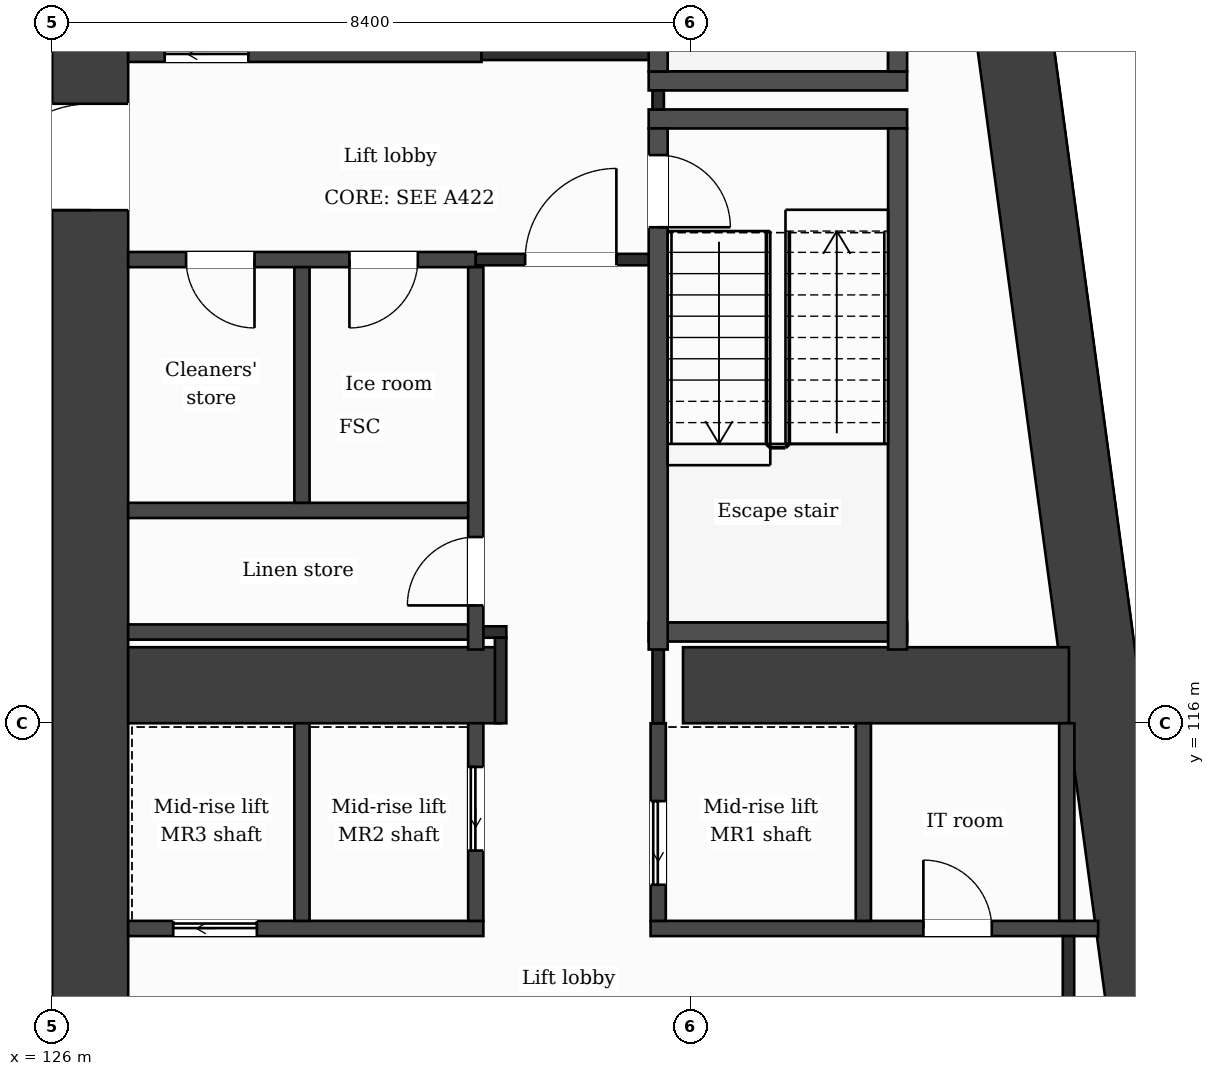
"""IFC4 building model, lengths in metres.
Left out: names, types, materials, properties, quantities, classifications, styles, units other than length and angle.
Written with IfcOpenShell. Run it as: python <this file> out.ifc"""

import sys

from ifc_helpers import new_model, si_unit, direction, frame, frame_2d, origin, place, context, subcontext, project, spatial, rectangle, extrude, element, fill, save


model = new_model("IFC4")
c1 = context("Model", 3, precision=1e-05, world=origin(), true_north=direction((0.0, 1.0)))
c2 = subcontext(c1, "Body", "Model", "MODEL_VIEW")
j1 = project(units=[si_unit("LENGTHUNIT", "METRE"), si_unit("PLANEANGLEUNIT", "RADIAN")], contexts=[c1])
p1 = place(None, origin())
s1 = spatial("IfcSite", under=j1, at=p1, CompositionType="ELEMENT")
p2 = place(p1, origin())
s2 = spatial("IfcBuilding", under=s1, at=p2, CompositionType="ELEMENT")
p3 = place(p2, frame((0.0, 0.0, 94.7)))
s3 = spatial("IfcBuildingStorey", under=s2, at=p3, CompositionType="ELEMENT", Elevation=94.7)
p4 = place(p3, frame((137.732, 131.9, 0.0), z_axis=(0.0, 0.0, 1.0), x_axis=(0.133411141623, -0.991060778808, 0.0)))
e1 = element("IfcWall", 1, at=p4, inside=s3, PredefinedType="SHEAR", context=c2, shape_type="SweptSolid", body=[
    extrude(rectangle(XDim=21.189, YDim=1.0, at=frame_2d((10.595, 0.0))), origin(), (0.0, 0.0, 1.0), 3.7),
])
p5 = place(p3, frame((126.5, 110.9, 0.0), z_axis=(0.0, 0.0, 1.0), x_axis=(0.0, 1.0, 0.0)))
e2 = element("IfcWall", 2, at=p5, inside=s3, PredefinedType="SHEAR", context=c2, shape_type="SweptSolid", body=[
    extrude(rectangle(XDim=21.0, YDim=1.0, at=frame_2d((10.5, 0.0))), origin(), (0.0, 0.0, 1.0), 3.7),
])
p6 = place(p5, frame((11.85, 0.0, 0.0)))
e3 = element("IfcOpeningElement", 3, at=p6, cuts=e2, PredefinedType="OPENING", context=c2, shape_type="SweptSolid", body=[
    extrude(rectangle(XDim=1.4, YDim=2.1, at=frame_2d((0.7, 1.05))), frame((0.0, 0.51, 0.0), z_axis=(0.0, -1.0, 0.0), x_axis=(1.0, 0.0, 0.0)), (0.0, 0.0, 1.0), 1.02),
])
p7 = place(p3, frame((127.0, 116.5, 0.0), z_axis=(0.0, 0.0, 1.0), x_axis=(1.0, 0.0, 0.0)))
e4 = element("IfcWall", 4, at=p7, inside=s3, PredefinedType="SHEAR", context=c2, shape_type="SweptSolid", body=[
    extrude(rectangle(XDim=4.9, YDim=1.0, at=frame_2d((2.45, 0.0))), origin(), (0.0, 0.0, 1.0), 3.7),
])
p8 = place(p3, frame((134.3, 116.5, 0.0), z_axis=(0.0, 0.0, 1.0), x_axis=(1.0, 0.0, 0.0)))
e5 = element("IfcWall", 5, at=p8, inside=s3, PredefinedType="SHEAR", context=c2, shape_type="SweptSolid", body=[
    extrude(rectangle(XDim=5.077, YDim=1.0, at=frame_2d((2.539, 0.0))), origin(), (0.0, 0.0, 1.0), 3.7),
])
p9 = place(p3, frame((127.0, 113.3, 0.0), z_axis=(0.0, 0.0, 1.0), x_axis=(1.0, 0.0, 0.0)))
e6 = element("IfcWall", 6, at=p9, inside=s3, PredefinedType="PARTITIONING", context=c2, shape_type="SweptSolid", body=[
    extrude(rectangle(XDim=4.673, YDim=0.2, at=frame_2d((2.336, 0.0))), origin(), (0.0, 0.0, 1.0), 3.38),
])
p10 = place(p9, frame((0.593, 0.0, 0.0)))
e7 = element("IfcOpeningElement", 7, at=p10, cuts=e6, PredefinedType="OPENING", context=c2, shape_type="SweptSolid", body=[
    extrude(rectangle(XDim=1.1, YDim=2.1, at=frame_2d((0.55, 1.05))), frame((0.0, 0.11, 0.0), z_axis=(0.0, -1.0, 0.0), x_axis=(1.0, 0.0, 0.0)), (0.0, 0.0, 1.0), 0.22),
])
p11 = place(p3, frame((133.873, 113.3, 0.0), z_axis=(0.0, 0.0, 1.0), x_axis=(1.0, 0.0, 0.0)))
e8 = element("IfcWall", 8, at=p11, inside=s3, PredefinedType="PARTITIONING", context=c2, shape_type="SweptSolid", body=[
    extrude(rectangle(XDim=5.888, YDim=0.2, at=frame_2d((2.944, 0.0))), origin(), (0.0, 0.0, 1.0), 3.38),
])
p12 = place(p11, frame((3.589, 0.0, 0.0)))
e9 = element("IfcOpeningElement", 9, at=p12, cuts=e8, PredefinedType="OPENING", context=c2, shape_type="SweptSolid", body=[
    extrude(rectangle(XDim=0.9, YDim=2.1, at=frame_2d((0.45, 1.05))), frame((0.0, 0.11, 0.0), z_axis=(0.0, -1.0, 0.0), x_axis=(1.0, 0.0, 0.0)), (0.0, 0.0, 1.0), 0.22),
])
p13 = place(p3, frame((127.0, 117.2, 0.0), z_axis=(0.0, 0.0, 1.0), x_axis=(1.0, 0.0, 0.0)))
e10 = element("IfcWall", 10, at=p13, inside=s3, PredefinedType="PARTITIONING", context=c2, shape_type="SweptSolid", body=[
    extrude(rectangle(XDim=4.573, YDim=0.2, at=frame_2d((2.287, 0.0))), origin(), (0.0, 0.0, 1.0), 3.38),
])
p14 = place(p3, frame((131.573, 117.2, 0.0), z_axis=(0.0, 0.0, 1.0), x_axis=(1.0, 0.0, 0.0)))
e11 = element("IfcWall", 11, at=p14, inside=s3, PredefinedType="PARTITIONING", context=c2, shape_type="SweptSolid", body=[
    extrude(rectangle(XDim=0.402, YDim=0.15, at=frame_2d((0.201, 0.0))), origin(), (0.0, 0.0, 1.0), 3.38),
])
p15 = place(p3, frame((133.848, 117.2, 0.0), z_axis=(0.0, 0.0, 1.0), x_axis=(1.0, 0.0, 0.0)))
e12 = element("IfcWall", 12, at=p15, inside=s3, PredefinedType="PARTITIONING", context=c2, shape_type="SweptSolid", body=[
    extrude(rectangle(XDim=3.4, YDim=0.25, at=frame_2d((1.7, 0.0))), origin(), (0.0, 0.0, 1.0), 3.38),
])
p16 = place(p3, frame((127.0, 118.8, 0.0), z_axis=(0.0, 0.0, 1.0), x_axis=(1.0, 0.0, 0.0)))
e13 = element("IfcWall", 13, at=p16, inside=s3, PredefinedType="PARTITIONING", context=c2, shape_type="SweptSolid", body=[
    extrude(rectangle(XDim=4.573, YDim=0.2, at=frame_2d((2.287, 0.0))), origin(), (0.0, 0.0, 1.0), 3.38),
])
p17 = place(p3, frame((127.0, 122.1, 0.0), z_axis=(0.0, 0.0, 1.0), x_axis=(1.0, 0.0, 0.0)))
e14 = element("IfcWall", 14, at=p17, inside=s3, PredefinedType="PARTITIONING", context=c2, shape_type="SweptSolid", body=[
    extrude(rectangle(XDim=4.573, YDim=0.2, at=frame_2d((2.287, 0.0))), origin(), (0.0, 0.0, 1.0), 3.38),
])
p18 = place(p17, frame((2.911, 0.0, 0.0)))
e15 = element("IfcOpeningElement", 15, at=p18, cuts=e14, PredefinedType="OPENING", context=c2, shape_type="SweptSolid", body=[
    extrude(rectangle(XDim=0.9, YDim=2.1, at=frame_2d((0.45, 1.05))), frame((0.0, 0.11, 0.0), z_axis=(0.0, -1.0, 0.0), x_axis=(1.0, 0.0, 0.0)), (0.0, 0.0, 1.0), 0.22),
])
p19 = place(p17, frame((0.762, 0.0, 0.0)))
e16 = element("IfcOpeningElement", 16, at=p19, cuts=e14, PredefinedType="OPENING", context=c2, shape_type="SweptSolid", body=[
    extrude(rectangle(XDim=0.9, YDim=2.1, at=frame_2d((0.45, 1.05))), frame((0.0, 0.11, 0.0), z_axis=(0.0, -1.0, 0.0), x_axis=(1.0, 0.0, 0.0)), (0.0, 0.0, 1.0), 0.22),
])
p20 = place(p3, frame((131.573, 122.1, 0.0), z_axis=(0.0, 0.0, 1.0), x_axis=(1.0, 0.0, 0.0)))
e17 = element("IfcWall", 17, at=p20, inside=s3, PredefinedType="PARTITIONING", context=c2, shape_type="SweptSolid", body=[
    extrude(rectangle(XDim=2.4, YDim=0.15, at=frame_2d((1.2, 0.0))), origin(), (0.0, 0.0, 1.0), 3.38),
])
p21 = place(p20, frame((0.65, 0.0, 0.0)))
e18 = element("IfcOpeningElement", 18, at=p21, cuts=e17, PredefinedType="OPENING", context=c2, shape_type="SweptSolid", body=[
    extrude(rectangle(XDim=1.2, YDim=2.1, at=frame_2d((0.6, 1.05))), frame((0.0, 0.085, 0.0), z_axis=(0.0, -1.0, 0.0), x_axis=(1.0, 0.0, 0.0)), (0.0, 0.0, 1.0), 0.17),
])
p22 = place(p3, frame((100.8, 122.45, 0.0), z_axis=(0.0, 0.0, 1.0), x_axis=(1.0, 0.0, 0.0)))
e19 = element("IfcWall", 19, at=p22, inside=s3, PredefinedType="PARTITIONING", context=c2, shape_type="SweptSolid", body=[
    extrude(rectangle(XDim=25.2, YDim=0.15, at=frame_2d((12.6, 0.0))), origin(), (0.0, 0.0, 1.0), 3.38),
])
for number, where, z_axis, x_axis in (
    (20, (133.848, 123.95, 0.0), (0.0, 0.0, 1.0), (1.0, 0.0, 0.0)),
    (21, (133.848, 124.45, 0.0), (0.0, 0.0, 1.0), (1.0, 0.0, 0.0)),
):
    element("IfcWall", number, at=place(p3, frame(where, z_axis=z_axis, x_axis=x_axis)), inside=s3, PredefinedType="PARTITIONING", context=c2, shape_type="SweptSolid", body=[
        extrude(rectangle(XDim=3.4, YDim=0.25, at=frame_2d((1.7, 0.0))), origin(), (0.0, 0.0, 1.0), 3.38),
    ])
p23 = place(p3, frame((100.8, 124.45, 0.0), z_axis=(0.0, 0.0, 1.0), x_axis=(1.0, 0.0, 0.0)))
e22 = element("IfcWall", 22, at=p23, inside=s3, PredefinedType="PARTITIONING", context=c2, shape_type="SweptSolid", body=[
    extrude(rectangle(XDim=25.2, YDim=0.15, at=frame_2d((12.6, 0.0))), origin(), (0.0, 0.0, 1.0), 3.38),
])
p24 = place(p23, frame((4.275, 0.0, 0.0)))
e23 = element("IfcOpeningElement", 23, at=p24, cuts=e22, PredefinedType="OPENING", context=c2, shape_type="SweptSolid", body=[
    extrude(rectangle(XDim=1.0, YDim=2.1, at=frame_2d((0.5, 1.05))), frame((0.0, 0.085, 0.0), z_axis=(0.0, -1.0, 0.0), x_axis=(1.0, 0.0, 0.0)), (0.0, 0.0, 1.0), 0.17),
])
p25 = place(p23, frame((1.0, 0.0, 0.0)))
e24 = element("IfcOpeningElement", 24, at=p25, cuts=e22, PredefinedType="OPENING", context=c2, shape_type="SweptSolid", body=[
    extrude(rectangle(XDim=1.0, YDim=2.1, at=frame_2d((0.5, 1.05))), frame((0.0, 0.085, 0.0), z_axis=(0.0, -1.0, 0.0), x_axis=(1.0, 0.0, 0.0)), (0.0, 0.0, 1.0), 0.17),
])
p26 = place(p23, frame((12.1, 0.0, 0.0)))
e25 = element("IfcOpeningElement", 25, at=p26, cuts=e22, PredefinedType="OPENING", context=c2, shape_type="SweptSolid", body=[
    extrude(rectangle(XDim=1.0, YDim=2.1, at=frame_2d((0.5, 1.05))), frame((0.0, 0.085, 0.0), z_axis=(0.0, -1.0, 0.0), x_axis=(1.0, 0.0, 0.0)), (0.0, 0.0, 1.0), 0.17),
])
p27 = place(p23, frame((19.83, 0.0, 0.0)))
e26 = element("IfcOpeningElement", 26, at=p27, cuts=e22, PredefinedType="OPENING", context=c2, shape_type="SweptSolid", body=[
    extrude(rectangle(XDim=1.0, YDim=2.1, at=frame_2d((0.5, 1.05))), frame((0.0, 0.085, 0.0), z_axis=(0.0, -1.0, 0.0), x_axis=(1.0, 0.0, 0.0)), (0.0, 0.0, 1.0), 0.17),
])
p28 = place(p3, frame((127.0, 124.8, 0.0), z_axis=(0.0, 0.0, 1.0), x_axis=(1.0, 0.0, 0.0)))
e27 = element("IfcWall", 27, at=p28, inside=s3, PredefinedType="PARTITIONING", context=c2, shape_type="SweptSolid", body=[
    extrude(rectangle(XDim=4.649, YDim=0.2, at=frame_2d((2.324, 0.0))), origin(), (0.0, 0.0, 1.0), 3.38),
])
p29 = place(p28, frame((0.481, 0.0, 0.0)))
e28 = element("IfcOpeningElement", 28, at=p29, cuts=e27, PredefinedType="OPENING", context=c2, shape_type="SweptSolid", body=[
    extrude(rectangle(XDim=1.1, YDim=2.1, at=frame_2d((0.55, 1.05))), frame((0.0, 0.11, 0.0), z_axis=(0.0, -1.0, 0.0), x_axis=(1.0, 0.0, 0.0)), (0.0, 0.0, 1.0), 0.22),
])
p30 = place(p3, frame((131.649, 124.8, 0.0), z_axis=(0.0, 0.0, 1.0), x_axis=(1.0, 0.0, 0.0)))
e29 = element("IfcWall", 29, at=p30, inside=s3, PredefinedType="PARTITIONING", context=c2, shape_type="SweptSolid", body=[
    extrude(rectangle(XDim=2.449, YDim=0.15, at=frame_2d((1.225, 0.0))), origin(), (0.0, 0.0, 1.0), 3.38),
])
p31 = place(p3, frame((129.287, 113.4, 0.0), z_axis=(0.0, 0.0, 1.0), x_axis=(0.0, 1.0, 0.0)))
e30 = element("IfcWall", 30, at=p31, inside=s3, PredefinedType="PARTITIONING", context=c2, shape_type="SweptSolid", body=[
    extrude(rectangle(XDim=2.6, YDim=0.2, at=frame_2d((1.3, 0.0))), origin(), (0.0, 0.0, 1.0), 3.38),
])
p32 = place(p3, frame((129.287, 118.9, 0.0), z_axis=(0.0, 0.0, 1.0), x_axis=(0.0, 1.0, 0.0)))
e31 = element("IfcWall", 31, at=p32, inside=s3, PredefinedType="PARTITIONING", context=c2, shape_type="SweptSolid", body=[
    extrude(rectangle(XDim=3.1, YDim=0.2, at=frame_2d((1.55, 0.0))), origin(), (0.0, 0.0, 1.0), 3.38),
])
p33 = place(p3, frame((131.573, 113.4, 0.0), z_axis=(0.0, 0.0, 1.0), x_axis=(0.0, 1.0, 0.0)))
e32 = element("IfcWall", 32, at=p33, inside=s3, PredefinedType="PARTITIONING", context=c2, shape_type="SweptSolid", body=[
    extrude(rectangle(XDim=2.6, YDim=0.2, at=frame_2d((1.3, 0.0))), origin(), (0.0, 0.0, 1.0), 3.38),
])
p34 = place(p33, frame((0.925, 0.0, 0.0)))
e33 = element("IfcOpeningElement", 33, at=p34, cuts=e32, PredefinedType="OPENING", context=c2, shape_type="SweptSolid", body=[
    extrude(rectangle(XDim=1.1, YDim=2.1, at=frame_2d((0.55, 1.05))), frame((0.0, 0.11, 0.0), z_axis=(0.0, -1.0, 0.0), x_axis=(1.0, 0.0, 0.0)), (0.0, 0.0, 1.0), 0.22),
])
p35 = place(p3, frame((131.573, 116.97, 0.0), z_axis=(0.0, 0.0, 1.0), x_axis=(0.0, 1.0, 0.0)))
e34 = element("IfcWall", 34, at=p35, inside=s3, PredefinedType="PARTITIONING", context=c2, shape_type="SweptSolid", body=[
    extrude(rectangle(XDim=5.03, YDim=0.2, at=frame_2d((2.515, 0.0))), origin(), (0.0, 0.0, 1.0), 3.38),
])
p36 = place(p35, frame((0.58, 0.0, 0.0)))
e35 = element("IfcOpeningElement", 35, at=p36, cuts=e34, PredefinedType="OPENING", context=c2, shape_type="SweptSolid", body=[
    extrude(rectangle(XDim=0.9, YDim=2.1, at=frame_2d((0.45, 1.05))), frame((0.0, 0.11, 0.0), z_axis=(0.0, -1.0, 0.0), x_axis=(1.0, 0.0, 0.0)), (0.0, 0.0, 1.0), 0.22),
])
p37 = place(p3, frame((131.9, 116.0, 0.0), z_axis=(0.0, 0.0, 1.0), x_axis=(0.0, 1.0, 0.0)))
e36 = element("IfcWall", 36, at=p37, inside=s3, PredefinedType="PARTITIONING", context=c2, shape_type="SweptSolid", body=[
    extrude(rectangle(XDim=1.125, YDim=0.15, at=frame_2d((0.562, 0.0))), origin(), (0.0, 0.0, 1.0), 3.38),
])
p38 = place(p3, frame((133.973, 113.4, 0.0), z_axis=(0.0, 0.0, 1.0), x_axis=(0.0, 1.0, 0.0)))
e37 = element("IfcWall", 37, at=p38, inside=s3, PredefinedType="PARTITIONING", context=c2, shape_type="SweptSolid", body=[
    extrude(rectangle(XDim=2.6, YDim=0.2, at=frame_2d((1.3, 0.0))), origin(), (0.0, 0.0, 1.0), 3.38),
])
p39 = place(p38, frame((0.475, 0.0, 0.0)))
e38 = element("IfcOpeningElement", 38, at=p39, cuts=e37, PredefinedType="OPENING", context=c2, shape_type="SweptSolid", body=[
    extrude(rectangle(XDim=1.1, YDim=2.1, at=frame_2d((0.55, 1.05))), frame((0.0, 0.11, 0.0), z_axis=(0.0, -1.0, 0.0), x_axis=(1.0, 0.0, 0.0)), (0.0, 0.0, 1.0), 0.22),
])
p40 = place(p3, frame((133.973, 116.0, 0.0), z_axis=(0.0, 0.0, 1.0), x_axis=(0.0, 1.0, 0.0)))
e39 = element("IfcWall", 39, at=p40, inside=s3, PredefinedType="PARTITIONING", context=c2, shape_type="SweptSolid", body=[
    extrude(rectangle(XDim=0.97, YDim=0.15, at=frame_2d((0.485, 0.0))), origin(), (0.0, 0.0, 1.0), 3.38),
])
p41 = place(p3, frame((133.973, 124.075, 0.0), z_axis=(0.0, 0.0, 1.0), x_axis=(0.0, 1.0, 0.0)))
e40 = element("IfcWall", 40, at=p41, inside=s3, PredefinedType="PARTITIONING", context=c2, shape_type="SweptSolid", body=[
    extrude(rectangle(XDim=0.25, YDim=0.15, at=frame_2d((0.125, 0.0))), origin(), (0.0, 0.0, 1.0), 3.38),
])
p42 = place(p3, frame((133.973, 116.97, 0.0), z_axis=(0.0, 0.0, 1.0), x_axis=(0.0, 1.0, 0.0)))
e41 = element("IfcWall", 41, at=p42, inside=s3, PredefinedType="PARTITIONING", context=c2, shape_type="SweptSolid", body=[
    extrude(rectangle(XDim=6.855, YDim=0.25, at=frame_2d((3.427, 0.0))), origin(), (0.0, 0.0, 1.0), 3.38),
])
p43 = place(p42, frame((5.555, 0.0, 0.0)))
e42 = element("IfcOpeningElement", 42, at=p43, cuts=e41, PredefinedType="OPENING", context=c2, shape_type="SweptSolid", body=[
    extrude(rectangle(XDim=0.95, YDim=2.1, at=frame_2d((0.475, 1.05))), frame((0.0, 0.135, 0.0), z_axis=(0.0, -1.0, 0.0), x_axis=(1.0, 0.0, 0.0)), (0.0, 0.0, 1.0), 0.27),
])
p44 = place(p3, frame((133.973, 124.575, 0.0), z_axis=(0.0, 0.0, 1.0), x_axis=(0.0, 1.0, 0.0)))
e43 = element("IfcWall", 43, at=p44, inside=s3, PredefinedType="PARTITIONING", context=c2, shape_type="SweptSolid", body=[
    extrude(rectangle(XDim=6.855, YDim=0.25, at=frame_2d((3.427, 0.0))), origin(), (0.0, 0.0, 1.0), 3.38),
])
p45 = place(p44, frame((5.325, 0.0, 0.0)))
e44 = element("IfcOpeningElement", 44, at=p45, cuts=e43, PredefinedType="OPENING", context=c2, shape_type="SweptSolid", body=[
    extrude(rectangle(XDim=1.0, YDim=2.1, at=frame_2d((0.5, 1.05))), frame((0.0, 0.135, 0.0), z_axis=(0.0, -1.0, 0.0), x_axis=(1.0, 0.0, 0.0)), (0.0, 0.0, 1.0), 0.27),
])
p46 = place(p3, frame((136.672, 113.4, 0.0), z_axis=(0.0, 0.0, 1.0), x_axis=(0.0, 1.0, 0.0)))
e45 = element("IfcWall", 45, at=p46, inside=s3, PredefinedType="PARTITIONING", context=c2, shape_type="SweptSolid", body=[
    extrude(rectangle(XDim=2.6, YDim=0.2, at=frame_2d((1.3, 0.0))), origin(), (0.0, 0.0, 1.0), 3.38),
])
for number, where, z_axis, x_axis in (
    (46, (137.123, 116.97, 0.0), (0.0, 0.0, 1.0), (0.0, 1.0, 0.0)),
    (47, (137.123, 124.575, 0.0), (0.0, 0.0, 1.0), (0.0, 1.0, 0.0)),
):
    element("IfcWall", number, at=place(p3, frame(where, z_axis=z_axis, x_axis=x_axis)), inside=s3, PredefinedType="PARTITIONING", context=c2, shape_type="SweptSolid", body=[
        extrude(rectangle(XDim=6.855, YDim=0.25, at=frame_2d((3.427, 0.0))), origin(), (0.0, 0.0, 1.0), 3.38),
    ])
p47 = place(p3, frame((139.349, 113.4, 0.0), z_axis=(0.0, 0.0, 1.0), x_axis=(0.0, 1.0, 0.0)))
e48 = element("IfcWall", 48, at=p47, inside=s3, PredefinedType="PARTITIONING", context=c2, shape_type="SweptSolid", body=[
    extrude(rectangle(XDim=2.6, YDim=0.2, at=frame_2d((1.3, 0.0))), origin(), (0.0, 0.0, 1.0), 3.38),
])
p48 = place(p3, frame((139.371, 111.4, 0.0), z_axis=(0.0, 0.0, 1.0), x_axis=(0.0, 1.0, 0.0)))
e49 = element("IfcWall", 49, at=p48, inside=s3, PredefinedType="PARTITIONING", context=c2, shape_type="SweptSolid", body=[
    extrude(rectangle(XDim=1.8, YDim=0.15, at=frame_2d((0.9, 0.0))), origin(), (0.0, 0.0, 1.0), 3.38),
])
p49 = place(p21, origin())
e50 = element("IfcDoor", 50, at=p49, inside=s3, OperationType="SINGLE_SWING_RIGHT", PredefinedType="DOOR", context=c2, shape_type="SweptSolid", body=[
    extrude(rectangle(XDim=1.2, YDim=2.1, at=frame_2d((0.6, 1.05))), frame((0.0, 0.025, 0.0), z_axis=(0.0, -1.0, 0.0), x_axis=(1.0, 0.0, 0.0)), (0.0, 0.0, 1.0), 0.05),
])
fill(e18, e50)
p50 = place(p29, origin())
e51 = element("IfcDoor", 51, at=p50, inside=s3, OperationType="SLIDING_TO_LEFT", PredefinedType="DOOR", context=c2, shape_type="SweptSolid", body=[
    extrude(rectangle(XDim=1.1, YDim=2.1, at=frame_2d((0.55, 1.05))), frame((0.0, 0.025, 0.0), z_axis=(0.0, -1.0, 0.0), x_axis=(1.0, 0.0, 0.0)), (0.0, 0.0, 1.0), 0.05),
])
fill(e28, e51)
p51 = place(p18, origin())
e52 = element("IfcDoor", 52, at=p51, inside=s3, OperationType="SINGLE_SWING_LEFT", PredefinedType="DOOR", context=c2, shape_type="SweptSolid", body=[
    extrude(rectangle(XDim=0.9, YDim=2.1, at=frame_2d((0.45, 1.05))), frame((0.0, 0.025, 0.0), z_axis=(0.0, -1.0, 0.0), x_axis=(1.0, 0.0, 0.0)), (0.0, 0.0, 1.0), 0.05),
])
fill(e15, e52)
p52 = place(p19, origin())
e53 = element("IfcDoor", 53, at=p52, inside=s3, OperationType="SINGLE_SWING_RIGHT", PredefinedType="DOOR", context=c2, shape_type="SweptSolid", body=[
    extrude(rectangle(XDim=0.9, YDim=2.1, at=frame_2d((0.45, 1.05))), frame((0.0, 0.025, 0.0), z_axis=(0.0, -1.0, 0.0), x_axis=(1.0, 0.0, 0.0)), (0.0, 0.0, 1.0), 0.05),
])
fill(e16, e53)
p53 = place(p43, origin())
e54 = element("IfcDoor", 54, at=p53, inside=s3, OperationType="SINGLE_SWING_LEFT", PredefinedType="DOOR", context=c2, shape_type="SweptSolid", body=[
    extrude(rectangle(XDim=0.95, YDim=2.1, at=frame_2d((0.475, 1.05))), frame((0.0, 0.025, 0.0), z_axis=(0.0, -1.0, 0.0), x_axis=(1.0, 0.0, 0.0)), (0.0, 0.0, 1.0), 0.05),
])
fill(e42, e54)
p54 = place(p36, origin())
e55 = element("IfcDoor", 55, at=p54, inside=s3, OperationType="SINGLE_SWING_LEFT", PredefinedType="DOOR", context=c2, shape_type="SweptSolid", body=[
    extrude(rectangle(XDim=0.9, YDim=2.1, at=frame_2d((0.45, 1.05))), frame((0.0, 0.025, 0.0), z_axis=(0.0, -1.0, 0.0), x_axis=(1.0, 0.0, 0.0)), (0.0, 0.0, 1.0), 0.05),
])
fill(e35, e55)
p55 = place(p39, origin())
e56 = element("IfcDoor", 56, at=p55, inside=s3, OperationType="SLIDING_TO_LEFT", PredefinedType="DOOR", context=c2, shape_type="SweptSolid", body=[
    extrude(rectangle(XDim=1.1, YDim=2.1, at=frame_2d((0.55, 1.05))), frame((0.0, 0.025, 0.0), z_axis=(0.0, -1.0, 0.0), x_axis=(1.0, 0.0, 0.0)), (0.0, 0.0, 1.0), 0.05),
])
fill(e38, e56)
p56 = place(p34, origin())
e57 = element("IfcDoor", 57, at=p56, inside=s3, OperationType="SLIDING_TO_LEFT", PredefinedType="DOOR", context=c2, shape_type="SweptSolid", body=[
    extrude(rectangle(XDim=1.1, YDim=2.1, at=frame_2d((0.55, 1.05))), frame((0.0, 0.025, 0.0), z_axis=(0.0, -1.0, 0.0), x_axis=(1.0, 0.0, 0.0)), (0.0, 0.0, 1.0), 0.05),
])
fill(e33, e57)
p57 = place(p10, origin())
e58 = element("IfcDoor", 58, at=p57, inside=s3, OperationType="SLIDING_TO_LEFT", PredefinedType="DOOR", context=c2, shape_type="SweptSolid", body=[
    extrude(rectangle(XDim=1.1, YDim=2.1, at=frame_2d((0.55, 1.05))), frame((0.0, 0.025, 0.0), z_axis=(0.0, -1.0, 0.0), x_axis=(1.0, 0.0, 0.0)), (0.0, 0.0, 1.0), 0.05),
])
fill(e7, e58)
p58 = place(p12, origin())
e59 = element("IfcDoor", 59, at=p58, inside=s3, OperationType="SINGLE_SWING_LEFT", PredefinedType="DOOR", context=c2, shape_type="SweptSolid", body=[
    extrude(rectangle(XDim=0.9, YDim=2.1, at=frame_2d((0.45, 1.05))), frame((0.0, 0.025, 0.0), z_axis=(0.0, -1.0, 0.0), x_axis=(1.0, 0.0, 0.0)), (0.0, 0.0, 1.0), 0.05),
])
fill(e9, e59)
p59 = place(p6, origin())
e60 = element("IfcDoor", 60, at=p59, inside=s3, OperationType="SINGLE_SWING_LEFT", PredefinedType="DOOR", context=c2, shape_type="SweptSolid", body=[
    extrude(rectangle(XDim=1.4, YDim=2.1, at=frame_2d((0.7, 1.05))), frame((0.0, 0.025, 0.0), z_axis=(0.0, -1.0, 0.0), x_axis=(1.0, 0.0, 0.0)), (0.0, 0.0, 1.0), 0.05),
])
fill(e3, e60)
save(model, sys.argv[1])
